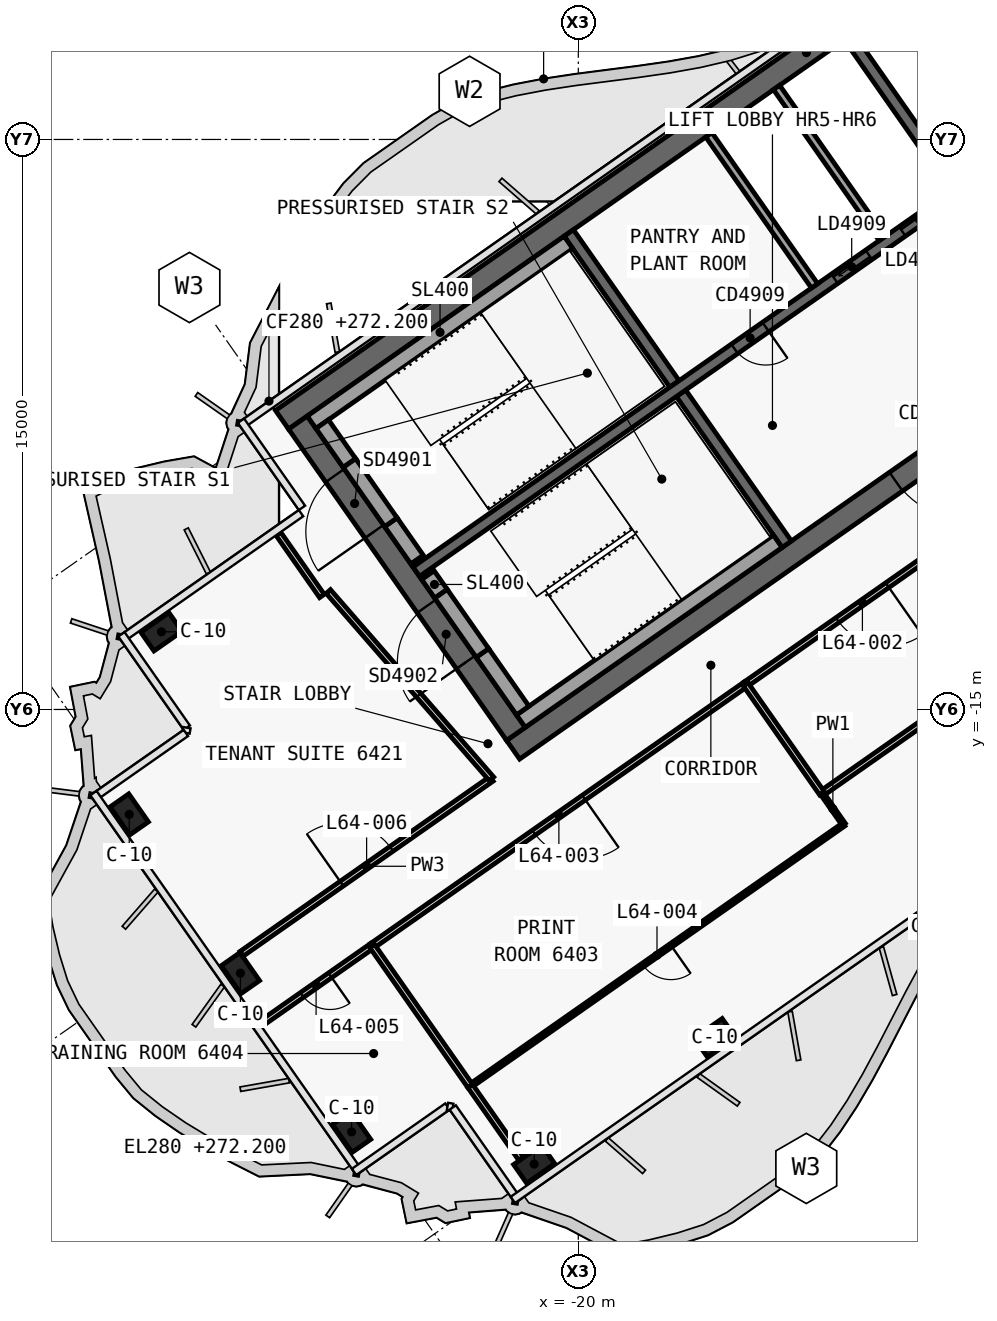
"""IFC4 building model, lengths in metres.
Left out: names, types, materials, properties, quantities, classifications, styles, units other than length and angle.
Written with IfcOpenShell. Run it as: python <this file> out.ifc"""

import sys

from ifc_helpers import new_model, si_unit, direction, frame, frame_2d, origin, origin_2d, place, context, subcontext, project, spatial, polyline, rectangle, outline, extrude, element, fill, save


model = new_model("IFC4")
c1 = context("Model", 3, precision=1e-05, world=origin(), true_north=direction((0.0, 1.0)))
c2 = subcontext(c1, "Body", "Model", "MODEL_VIEW")
j1 = project(units=[si_unit("LENGTHUNIT", "METRE"), si_unit("PLANEANGLEUNIT", "RADIAN")], contexts=[c1])
p1 = place(None, origin())
s1 = spatial("IfcSite", under=j1, at=p1, CompositionType="ELEMENT")
p2 = place(p1, origin())
s2 = spatial("IfcBuilding", under=s1, at=p2, CompositionType="ELEMENT")
p3 = place(p2, frame((0.0, 0.0, 272.2)))
s3 = spatial("IfcBuildingStorey", under=s2, at=p3, CompositionType="ELEMENT", Elevation=272.2)
p4 = place(p3, frame((-0.028, 12.066, 0.0), z_axis=(0.0, 0.0, 1.0), x_axis=(-0.819151382952, -0.573577380837, 0.0)))
e1 = element("IfcWall", 1, at=p4, inside=s3, PredefinedType="SHEAR", context=c2, shape_type="SweptSolid", body=[
    extrude(outline(polyline([(33.898, 0.3), (0.42, 0.3), (0.0, -0.3), (33.898, -0.3), (33.898, 0.3)])), origin(), (0.0, 0.0, 1.0), 3.9),
])
p5 = place(p3, frame((-0.028, -0.874, 0.0), z_axis=(0.0, 0.0, 1.0), x_axis=(-0.819150035022, -0.573579305871, 0.0)))
e2 = element("IfcWall", 2, at=p5, inside=s3, PredefinedType="SHEAR", context=c2, shape_type="SweptSolid", body=[
    extrude(outline(polyline([(26.476, 0.3), (0.42, 0.3), (0.0, -0.3), (26.476, -0.3), (26.476, 0.3)])), origin(), (0.0, 0.0, 1.0), 3.9),
])
p6 = place(p5, frame((2.976, 0.0, 0.0)))
e3 = element("IfcOpeningElement", 3, at=p6, cuts=e2, PredefinedType="OPENING", context=c2, shape_type="SweptSolid", body=[
    extrude(rectangle(XDim=2.4, YDim=2.1, at=frame_2d((1.2, 1.05))), frame((0.0, 0.31, 0.0), z_axis=(0.0, -1.0, 0.0), x_axis=(1.0, 0.0, 0.0)), (0.0, 0.0, 1.0), 0.62),
])
p7 = place(p5, frame((11.776, 0.0, 0.0)))
e4 = element("IfcOpeningElement", 4, at=p7, cuts=e2, PredefinedType="OPENING", context=c2, shape_type="SweptSolid", body=[
    extrude(rectangle(XDim=2.4, YDim=2.1, at=frame_2d((1.2, 1.05))), frame((0.0, 0.31, 0.0), z_axis=(0.0, -1.0, 0.0), x_axis=(1.0, 0.0, 0.0)), (0.0, 0.0, 1.0), 0.62),
])
p8 = place(p3, frame((-21.642, -15.642, 0.0), z_axis=(0.0, 0.0, 1.0), x_axis=(-0.573586866468, 0.819144740944, 0.0)))
e5 = element("IfcWall", 5, at=p8, inside=s3, PredefinedType="SHEAR", context=c2, shape_type="SweptSolid", body=[
    extrude(outline(polyline([(0.0, 0.3), (0.0, -0.3), (10.0, -0.3), (10.0, 0.3), (0.0, 0.3)])), origin(), (0.0, 0.0, 1.0), 3.9),
])
p9 = place(p8, frame((6.5, 0.0, 0.0)))
e6 = element("IfcOpeningElement", 6, at=p9, cuts=e5, PredefinedType="OPENING", context=c2, shape_type="SweptSolid", body=[
    extrude(rectangle(XDim=1.8, YDim=2.1, at=frame_2d((0.9, 1.05))), frame((0.0, 0.31, 0.0), z_axis=(0.0, -1.0, 0.0), x_axis=(1.0, 0.0, 0.0)), (0.0, 0.0, 1.0), 0.62),
])
p10 = place(p8, frame((2.3, 0.0, 0.0)))
e7 = element("IfcOpeningElement", 7, at=p10, cuts=e5, PredefinedType="OPENING", context=c2, shape_type="SweptSolid", body=[
    extrude(rectangle(XDim=1.8, YDim=2.1, at=frame_2d((0.9, 1.05))), frame((0.0, 0.31, 0.0), z_axis=(0.0, -1.0, 0.0), x_axis=(1.0, 0.0, 0.0)), (0.0, 0.0, 1.0), 0.62),
])
p11 = place(p3, frame((-10.097, -1.271, 0.0), z_axis=(0.0, 0.0, 1.0), x_axis=(-0.573560315113, 0.819163332265, 0.0)))
e8 = element("IfcWall", 8, at=p11, inside=s3, PredefinedType="SHEAR", context=c2, shape_type="SweptSolid", body=[
    extrude(outline(polyline([(4.85, -0.15), (4.85, 0.15), (0.0, 0.15), (0.0, -0.15), (4.85, -0.15)])), origin(), (0.0, 0.0, 1.0), 3.9),
])
p12 = place(p3, frame((-14.515, -10.652, 0.0), z_axis=(0.0, 0.0, 1.0), x_axis=(-0.573560315113, 0.819163332265, 0.0)))
e9 = element("IfcWall", 9, at=p12, inside=s3, PredefinedType="SHEAR", context=c2, shape_type="SweptSolid", body=[
    extrude(outline(polyline([(4.85, 0.15), (0.0, 0.15), (0.0, -0.15), (4.85, -0.15), (4.85, 0.15)])), origin(), (0.0, 0.0, 1.0), 3.9),
])
p13 = place(p3, frame((-17.469, -6.433, 0.0), z_axis=(0.0, 0.0, 1.0), x_axis=(-0.573594092424, 0.81913968109, 0.0)))
e10 = element("IfcWall", 10, at=p13, inside=s3, PredefinedType="SHEAR", context=c2, shape_type="SweptSolid", body=[
    extrude(outline(polyline([(4.85, -0.15), (4.85, 0.15), (0.0, 0.15), (0.0, -0.15), (4.85, -0.15)])), origin(), (0.0, 0.0, 1.0), 3.9),
])
p14 = place(p3, frame((-2.638, 3.768, 0.0), z_axis=(0.0, 0.0, 1.0), x_axis=(-0.819155014212, -0.573572194837, 0.0)))
e11 = element("IfcWall", 11, at=p14, inside=s3, PredefinedType="SHEAR", context=c2, shape_type="SweptSolid", body=[
    extrude(outline(polyline([(26.4, 0.15), (0.0, 0.15), (0.0, -0.15), (26.4, -0.15), (26.4, 0.15)])), origin(), (0.0, 0.0, 1.0), 3.9),
])
p15 = place(p14, frame((1.169, 0.0, 0.0)))
e12 = element("IfcOpeningElement", 12, at=p15, cuts=e11, PredefinedType="OPENING", context=c2, shape_type="SweptSolid", body=[
    extrude(rectangle(XDim=1.1, YDim=2.1, at=frame_2d((0.55, 1.05))), frame((0.0, 0.16, 0.0), z_axis=(0.0, -1.0, 0.0), x_axis=(1.0, 0.0, 0.0)), (0.0, 0.0, 1.0), 0.32),
])
p16 = place(p14, frame((3.206, 0.0, 0.0)))
e13 = element("IfcOpeningElement", 13, at=p16, cuts=e11, PredefinedType="OPENING", context=c2, shape_type="SweptSolid", body=[
    extrude(rectangle(XDim=1.1, YDim=2.1, at=frame_2d((0.55, 1.05))), frame((0.0, 0.16, 0.0), z_axis=(0.0, -1.0, 0.0), x_axis=(1.0, 0.0, 0.0)), (0.0, 0.0, 1.0), 0.32),
])
p17 = place(p14, frame((5.244, 0.0, 0.0)))
e14 = element("IfcOpeningElement", 14, at=p17, cuts=e11, PredefinedType="OPENING", context=c2, shape_type="SweptSolid", body=[
    extrude(rectangle(XDim=1.1, YDim=2.1, at=frame_2d((0.55, 1.05))), frame((0.0, 0.16, 0.0), z_axis=(0.0, -1.0, 0.0), x_axis=(1.0, 0.0, 0.0)), (0.0, 0.0, 1.0), 0.32),
])
p18 = place(p14, frame((7.281, 0.0, 0.0)))
e15 = element("IfcOpeningElement", 15, at=p18, cuts=e11, PredefinedType="OPENING", context=c2, shape_type="SweptSolid", body=[
    extrude(rectangle(XDim=1.1, YDim=2.1, at=frame_2d((0.55, 1.05))), frame((0.0, 0.16, 0.0), z_axis=(0.0, -1.0, 0.0), x_axis=(1.0, 0.0, 0.0)), (0.0, 0.0, 1.0), 0.32),
])
p19 = place(p14, frame((9.688, 0.0, 0.0)))
e16 = element("IfcOpeningElement", 16, at=p19, cuts=e11, PredefinedType="OPENING", context=c2, shape_type="SweptSolid", body=[
    extrude(rectangle(XDim=1.1, YDim=2.1, at=frame_2d((0.55, 1.05))), frame((0.0, 0.16, 0.0), z_axis=(0.0, -1.0, 0.0), x_axis=(1.0, 0.0, 0.0)), (0.0, 0.0, 1.0), 0.32),
])
p20 = place(p14, frame((11.863, 0.0, 0.0)))
e17 = element("IfcOpeningElement", 17, at=p20, cuts=e11, PredefinedType="OPENING", context=c2, shape_type="SweptSolid", body=[
    extrude(rectangle(XDim=1.1, YDim=2.1, at=frame_2d((0.55, 1.05))), frame((0.0, 0.16, 0.0), z_axis=(0.0, -1.0, 0.0), x_axis=(1.0, 0.0, 0.0)), (0.0, 0.0, 1.0), 0.32),
])
p21 = place(p14, frame((15.175, 0.0, 0.0)))
e18 = element("IfcOpeningElement", 18, at=p21, cuts=e11, PredefinedType="OPENING", context=c2, shape_type="SweptSolid", body=[
    extrude(rectangle(XDim=1.0, YDim=2.1, at=frame_2d((0.5, 1.05))), frame((0.0, 0.16, 0.0), z_axis=(0.0, -1.0, 0.0), x_axis=(1.0, 0.0, 0.0)), (0.0, 0.0, 1.0), 0.32),
])
for number, where, z_axis, x_axis in (
    (19, (-16.41, -23.637, 0.0), (0.0, 0.0, 1.0), (-0.819, -0.574, 0.0)),
    (20, (-21.161, -26.964, 0.0), (0.0, 0.0, 1.0), (-0.819, -0.574, 0.0)),
    (21, (-30.969, -12.956, 0.0), (0.0, 0.0, 1.0), (-0.819, -0.574, 0.0)),
    (22, (-25.966, -26.117, 0.0), (0.0, 0.0, 1.0), (-0.574, 0.819, 0.0)),
    (23, (-28.891, -21.939, 0.0), (0.0, 0.0, 1.0), (-0.574, 0.819, 0.0)),
    (24, (-31.816, -17.761, 0.0), (0.0, 0.0, 1.0), (-0.574, 0.819, 0.0)),
):
    element("IfcColumn", number, at=place(p3, frame(where, z_axis=z_axis, x_axis=x_axis)), inside=s3, PredefinedType="COLUMN", context=c2, shape_type="SweptSolid", body=[
        extrude(rectangle(XDim=0.9, YDim=0.6, at=origin_2d()), origin(), (0.0, 0.0, 1.0), 3.9),
    ])
p22 = place(p3, frame((-8.305, -0.017, 0.0), z_axis=(0.0, 0.0, 1.0), x_axis=(-0.573594092424, 0.81913968109, 0.0)))
e25 = element("IfcWall", 25, at=p22, inside=s3, PredefinedType="SOLIDWALL", context=c2, shape_type="SweptSolid", body=[
    extrude(rectangle(XDim=4.85, YDim=0.2, at=frame_2d((2.425, 0.0))), origin(), (0.0, 0.0, 1.0), 3.9),
])
p23 = place(p3, frame((-12.001, -2.605, 0.0), z_axis=(0.0, 0.0, 1.0), x_axis=(-0.573560315113, 0.819163332265, 0.0)))
e26 = element("IfcWall", 26, at=p23, inside=s3, PredefinedType="SOLIDWALL", context=c2, shape_type="SweptSolid", body=[
    extrude(rectangle(XDim=4.85, YDim=0.2, at=frame_2d((2.425, 0.0))), origin(), (0.0, 0.0, 1.0), 3.9),
])
p24 = place(p3, frame((-13.783, -3.852, 0.0), z_axis=(0.0, 0.0, 1.0), x_axis=(-0.573594092424, 0.81913968109, 0.0)))
e27 = element("IfcWall", 27, at=p24, inside=s3, PredefinedType="SOLIDWALL", context=c2, shape_type="SweptSolid", body=[
    extrude(rectangle(XDim=4.85, YDim=0.2, at=frame_2d((2.425, 0.0))), origin(), (0.0, 0.0, 1.0), 3.9),
])
p25 = place(p3, frame((-20.259, -2.71, 0.0), z_axis=(0.0, 0.0, 1.0), x_axis=(-0.81914849389, -0.573581506813, 0.0)))
e28 = element("IfcWall", 28, at=p25, inside=s3, PredefinedType="SOLIDWALL", context=c2, shape_type="SweptSolid", body=[
    extrude(rectangle(XDim=8.25, YDim=0.4, at=frame_2d((4.125, 0.0))), origin(), (0.0, 0.0, 1.0), 3.62),
])
p26 = place(p3, frame((-24.244, -11.055, 0.0), z_axis=(0.0, 0.0, 1.0), x_axis=(-0.573571582932, 0.819155442668, 0.0)))
e29 = element("IfcWall", 29, at=p26, inside=s3, PredefinedType="SOLIDWALL", context=c2, shape_type="SweptSolid", body=[
    extrude(rectangle(XDim=1.2, YDim=0.4, at=frame_2d((0.6, 0.0))), origin(), (0.0, 0.0, 1.0), 3.62),
])
p27 = place(p3, frame((-26.022, -8.515, 0.0), z_axis=(0.0, 0.0, 1.0), x_axis=(-0.573619628835, 0.819121798889, 0.0)))
e30 = element("IfcWall", 30, at=p27, inside=s3, PredefinedType="SOLIDWALL", context=c2, shape_type="SweptSolid", body=[
    extrude(rectangle(XDim=1.25, YDim=0.4, at=frame_2d((0.625, 0.0))), origin(), (0.0, 0.0, 1.0), 3.62),
])
p28 = place(p3, frame((-24.932, -10.072, 2.15), z_axis=(0.0, 0.0, 1.0), x_axis=(-0.573591692345, 0.819141361715, 0.0)))
e31 = element("IfcWall", 31, at=p28, inside=s3, PredefinedType="SOLIDWALL", context=c2, shape_type="SweptSolid", body=[
    extrude(rectangle(XDim=1.9, YDim=0.4, at=frame_2d((0.95, 0.0))), origin(), (0.0, 0.0, 1.0), 1.47),
])
p29 = place(p3, frame((-14.753, -10.574, 0.0), z_axis=(0.0, 0.0, 1.0), x_axis=(-0.819158229677, -0.573567602601, 0.0)))
e32 = element("IfcWall", 32, at=p29, inside=s3, PredefinedType="SOLIDWALL", context=c2, shape_type="SweptSolid", body=[
    extrude(rectangle(XDim=8.25, YDim=0.4, at=frame_2d((4.125, 0.0))), origin(), (0.0, 0.0, 1.0), 3.62),
])
p30 = place(p3, frame((-21.462, -15.028, 0.0), z_axis=(0.0, 0.0, 1.0), x_axis=(-0.573559770908, 0.819163713305, 0.0)))
e33 = element("IfcWall", 33, at=p30, inside=s3, PredefinedType="SOLIDWALL", context=c2, shape_type="SweptSolid", body=[
    extrude(rectangle(XDim=1.85, YDim=0.4, at=frame_2d((0.925, 0.0))), origin(), (0.0, 0.0, 1.0), 3.62),
])
p31 = place(p3, frame((-23.613, -11.956, 0.0), z_axis=(0.0, 0.0, 1.0), x_axis=(-0.573435029941, 0.819251039936, 0.0)))
e34 = element("IfcWall", 34, at=p31, inside=s3, PredefinedType="SOLIDWALL", context=c2, shape_type="SweptSolid", body=[
    extrude(rectangle(XDim=0.6, YDim=0.4, at=frame_2d((0.3, 0.0))), origin(), (0.0, 0.0, 1.0), 3.62),
])
p32 = place(p3, frame((-22.523, -13.512, 2.15), z_axis=(0.0, 0.0, 1.0), x_axis=(-0.573591692345, 0.819141361715, 0.0)))
e35 = element("IfcWall", 35, at=p32, inside=s3, PredefinedType="SOLIDWALL", context=c2, shape_type="SweptSolid", body=[
    extrude(rectangle(XDim=1.9, YDim=0.4, at=frame_2d((0.95, 0.0))), origin(), (0.0, 0.0, 1.0), 1.47),
])
p33 = place(p3, frame((-28.858, -21.428, 0.0), z_axis=(0.0, 0.0, 1.0), x_axis=(0.819137602434, 0.573597060905, 0.0)))
e36 = element("IfcWall", 36, at=p33, inside=s3, PredefinedType="PARTITIONING", context=c2, shape_type="SweptSolid", body=[
    extrude(rectangle(XDim=8.027, YDim=0.15, at=frame_2d((4.013, 0.0))), origin(), (0.0, 0.0, 1.0), 3.05),
])
p34 = place(p33, frame((3.213, 0.0, 0.0)))
e37 = element("IfcOpeningElement", 37, at=p34, cuts=e36, PredefinedType="OPENING", context=c2, shape_type="SweptSolid", body=[
    extrude(rectangle(XDim=1.6, YDim=2.1, at=frame_2d((0.8, 1.05))), frame((0.0, 0.085, 0.0), z_axis=(0.0, -1.0, 0.0), x_axis=(1.0, 0.0, 0.0)), (0.0, 0.0, 1.0), 0.17),
])
p35 = place(p3, frame((-9.451, -10.036, 0.0), z_axis=(0.0, 0.0, 1.0), x_axis=(-0.819164661457, -0.573558416746, 0.0)))
e38 = element("IfcWall", 38, at=p35, inside=s3, PredefinedType="PARTITIONING", context=c2, shape_type="SweptSolid", body=[
    extrude(rectangle(XDim=7.504, YDim=0.15, at=frame_2d((3.752, 0.0))), origin(), (0.0, 0.0, 1.0), 3.05),
])
p36 = place(p35, frame((2.952, 0.0, 0.0)))
e39 = element("IfcOpeningElement", 39, at=p36, cuts=e38, PredefinedType="OPENING", context=c2, shape_type="SweptSolid", body=[
    extrude(rectangle(XDim=1.6, YDim=2.1, at=frame_2d((0.8, 1.05))), frame((0.0, 0.085, 0.0), z_axis=(0.0, -1.0, 0.0), x_axis=(1.0, 0.0, 0.0)), (0.0, 0.0, 1.0), 0.17),
])
p37 = place(p3, frame((-15.594, -14.338, 0.0), z_axis=(0.0, 0.0, 1.0), x_axis=(-0.819154519377, -0.573572901543, 0.0)))
e40 = element("IfcWall", 40, at=p37, inside=s3, PredefinedType="PARTITIONING", context=c2, shape_type="SweptSolid", body=[
    extrude(rectangle(XDim=12.004, YDim=0.15, at=frame_2d((6.002, 0.0))), origin(), (0.0, 0.0, 1.0), 3.05),
])
p38 = place(p37, frame((5.202, 0.0, 0.0)))
e41 = element("IfcOpeningElement", 41, at=p38, cuts=e40, PredefinedType="OPENING", context=c2, shape_type="SweptSolid", body=[
    extrude(rectangle(XDim=1.6, YDim=2.1, at=frame_2d((0.8, 1.05))), frame((0.0, 0.085, 0.0), z_axis=(0.0, -1.0, 0.0), x_axis=(1.0, 0.0, 0.0)), (0.0, 0.0, 1.0), 0.17),
])
p39 = place(p3, frame((-25.424, -21.22, 0.0), z_axis=(0.0, 0.0, 1.0), x_axis=(-0.819142755392, -0.573589702042, 0.0)))
e42 = element("IfcWall", 42, at=p39, inside=s3, PredefinedType="PARTITIONING", context=c2, shape_type="SweptSolid", body=[
    extrude(rectangle(XDim=3.602, YDim=0.15, at=frame_2d((1.801, 0.0))), origin(), (0.0, 0.0, 1.0), 3.0),
])
p40 = place(p39, frame((1.351, 0.0, 0.0)))
e43 = element("IfcOpeningElement", 43, at=p40, cuts=e42, PredefinedType="OPENING", context=c2, shape_type="SweptSolid", body=[
    extrude(rectangle(XDim=0.9, YDim=2.1, at=frame_2d((0.45, 1.05))), frame((0.0, 0.085, 0.0), z_axis=(0.0, -1.0, 0.0), x_axis=(1.0, 0.0, 0.0)), (0.0, 0.0, 1.0), 0.17),
])
p41 = place(p3, frame((-26.746, -12.014, 0.0), z_axis=(0.0, 0.0, 1.0), x_axis=(-0.573568836472, 0.819157365729, 0.0)))
e44 = element("IfcWall", 44, at=p41, inside=s3, PredefinedType="PARTITIONING", context=c2, shape_type="SweptSolid", body=[
    extrude(rectangle(XDim=2.0, YDim=0.15, at=frame_2d((1.0, 0.0))), origin(), (0.0, 0.0, 1.0), 3.05),
])
p42 = place(p3, frame((-22.284, -16.826, 0.0), z_axis=(0.0, 0.0, 1.0), x_axis=(-0.656758142177, 0.754101281449, 0.0)))
e45 = element("IfcWall", 45, at=p42, inside=s3, PredefinedType="PARTITIONING", context=c2, shape_type="SweptSolid", body=[
    extrude(rectangle(XDim=6.539, YDim=0.15, at=frame_2d((3.269, 0.0))), origin(), (0.0, 0.0, 1.0), 3.62),
])
p43 = place(p3, frame((-7.445, -12.904, 0.0), z_axis=(0.0, 0.0, 1.0), x_axis=(-0.819137093595, -0.573597787563, 0.0)))
e46 = element("IfcWall", 46, at=p43, inside=s3, PredefinedType="PARTITIONING", context=c2, shape_type="SweptSolid", body=[
    extrude(rectangle(XDim=7.5, YDim=0.15, at=frame_2d((3.75, 0.0))), origin(), (0.0, 0.0, 1.0), 3.05),
])
p44 = place(p3, frame((-13.589, -17.206, 0.0), z_axis=(0.0, 0.0, 1.0), x_axis=(-0.573565328398, 0.819159822049, 0.0)))
e47 = element("IfcWall", 47, at=p44, inside=s3, PredefinedType="PARTITIONING", context=c2, shape_type="SweptSolid", body=[
    extrude(rectangle(XDim=3.5, YDim=0.15, at=frame_2d((1.75, 0.0))), origin(), (0.0, 0.0, 1.0), 3.62),
])
p45 = place(p3, frame((-13.588, -17.207, 0.0), z_axis=(0.0, 0.0, 1.0), x_axis=(0.573708088123, -0.819059844958, 0.0)))
e48 = element("IfcWall", 48, at=p45, inside=s3, PredefinedType="PARTITIONING", context=c2, shape_type="SweptSolid", body=[
    extrude(rectangle(XDim=1.0, YDim=0.1, at=frame_2d((0.5, 0.0))), origin(), (0.0, 0.0, 1.0), 3.62),
])
p46 = place(p3, frame((-13.014, -18.026, 0.0), z_axis=(0.0, 0.0, 1.0), x_axis=(-0.819146845232, -0.573583861302, 0.0)))
e49 = element("IfcWall", 49, at=p46, inside=s3, PredefinedType="PARTITIONING", context=c2, shape_type="SweptSolid", body=[
    extrude(rectangle(XDim=12.0, YDim=0.1, at=frame_2d((6.0, 0.0))), origin(), (0.0, 0.0, 1.0), 3.05),
])
p47 = place(p46, frame((5.55, 0.0, 0.0)))
e50 = element("IfcOpeningElement", 50, at=p47, cuts=e49, PredefinedType="OPENING", context=c2, shape_type="SweptSolid", body=[
    extrude(rectangle(XDim=0.9, YDim=2.1, at=frame_2d((0.45, 1.05))), frame((0.0, 0.06, 0.0), z_axis=(0.0, -1.0, 0.0), x_axis=(1.0, 0.0, 0.0)), (0.0, 0.0, 1.0), 0.12),
])
p48 = place(p3, frame((-21.509, -26.816, 0.0), z_axis=(0.0, 0.0, 1.0), x_axis=(-0.573546771379, 0.819172815126, 0.0)))
e51 = element("IfcWall", 51, at=p48, inside=s3, PredefinedType="PARTITIONING", context=c2, shape_type="SweptSolid", body=[
    extrude(rectangle(XDim=2.329, YDim=0.15, at=frame_2d((1.165, 0.0))), origin(), (0.0, 0.0, 1.0), 3.0),
])
p49 = place(p3, frame((-22.845, -24.908, 0.0), z_axis=(0.0, 0.0, 1.0), x_axis=(-0.573586141663, 0.819145248471, 0.0)))
e52 = element("IfcWall", 52, at=p49, inside=s3, PredefinedType="PARTITIONING", context=c2, shape_type="SweptSolid", body=[
    extrude(rectangle(XDim=4.5, YDim=0.15, at=frame_2d((2.25, 0.0))), origin(), (0.0, 0.0, 1.0), 3.05),
])
p50 = place(p19, origin())
e53 = element("IfcDoor", 53, at=p50, inside=s3, OperationType="SLIDING_TO_LEFT", PredefinedType="DOOR", context=c2, shape_type="SweptSolid", body=[
    extrude(rectangle(XDim=1.1, YDim=2.1, at=frame_2d((0.55, 1.05))), frame((0.0, 0.025, 0.0), z_axis=(0.0, -1.0, 0.0), x_axis=(1.0, 0.0, 0.0)), (0.0, 0.0, 1.0), 0.05),
])
fill(e16, e53)
p51 = place(p20, origin())
e54 = element("IfcDoor", 54, at=p51, inside=s3, OperationType="SLIDING_TO_RIGHT", PredefinedType="DOOR", context=c2, shape_type="SweptSolid", body=[
    extrude(rectangle(XDim=1.1, YDim=2.1, at=frame_2d((0.55, 1.05))), frame((0.0, 0.025, 0.0), z_axis=(0.0, -1.0, 0.0), x_axis=(1.0, 0.0, 0.0)), (0.0, 0.0, 1.0), 0.05),
])
fill(e17, e54)
p52 = place(p21, origin())
e55 = element("IfcDoor", 55, at=p52, inside=s3, OperationType="SINGLE_SWING_RIGHT", PredefinedType="DOOR", context=c2, shape_type="SweptSolid", body=[
    extrude(rectangle(XDim=1.0, YDim=2.1, at=frame_2d((0.5, 1.05))), frame((0.0, 0.025, 0.0), z_axis=(0.0, -1.0, 0.0), x_axis=(1.0, 0.0, 0.0)), (0.0, 0.0, 1.0), 0.05),
])
fill(e18, e55)
p53 = place(p7, origin())
e56 = element("IfcDoor", 56, at=p53, inside=s3, OperationType="DOUBLE_DOOR_SINGLE_SWING", PredefinedType="DOOR", context=c2, shape_type="SweptSolid", body=[
    extrude(rectangle(XDim=2.4, YDim=2.1, at=frame_2d((1.2, 1.05))), frame((0.0, 0.025, 0.0), z_axis=(0.0, -1.0, 0.0), x_axis=(1.0, 0.0, 0.0)), (0.0, 0.0, 1.0), 0.05),
])
fill(e4, e56)
p54 = place(p9, origin())
e57 = element("IfcDoor", 57, at=p54, inside=s3, OperationType="DOUBLE_DOOR_SINGLE_SWING", PredefinedType="DOOR", context=c2, shape_type="SweptSolid", body=[
    extrude(rectangle(XDim=1.8, YDim=2.1, at=frame_2d((0.9, 1.05))), frame((0.0, 0.025, 0.0), z_axis=(0.0, -1.0, 0.0), x_axis=(1.0, 0.0, 0.0)), (0.0, 0.0, 1.0), 0.05),
])
fill(e6, e57)
p55 = place(p10, origin())
e58 = element("IfcDoor", 58, at=p55, inside=s3, OperationType="DOUBLE_DOOR_SINGLE_SWING", PredefinedType="DOOR", context=c2, shape_type="SweptSolid", body=[
    extrude(rectangle(XDim=1.8, YDim=2.1, at=frame_2d((0.9, 1.05))), frame((0.0, 0.025, 0.0), z_axis=(0.0, -1.0, 0.0), x_axis=(1.0, 0.0, 0.0)), (0.0, 0.0, 1.0), 0.05),
])
fill(e7, e58)
p56 = place(p36, origin())
e59 = element("IfcDoor", 59, at=p56, inside=s3, OperationType="DOUBLE_DOOR_SINGLE_SWING", PredefinedType="DOOR", context=c2, shape_type="SweptSolid", body=[
    extrude(rectangle(XDim=1.6, YDim=2.1, at=frame_2d((0.8, 1.05))), frame((0.0, 0.025, 0.0), z_axis=(0.0, -1.0, 0.0), x_axis=(1.0, 0.0, 0.0)), (0.0, 0.0, 1.0), 0.05),
])
fill(e39, e59)
p57 = place(p38, origin())
e60 = element("IfcDoor", 60, at=p57, inside=s3, OperationType="DOUBLE_DOOR_SINGLE_SWING", PredefinedType="DOOR", context=c2, shape_type="SweptSolid", body=[
    extrude(rectangle(XDim=1.6, YDim=2.1, at=frame_2d((0.8, 1.05))), frame((0.0, 0.025, 0.0), z_axis=(0.0, -1.0, 0.0), x_axis=(1.0, 0.0, 0.0)), (0.0, 0.0, 1.0), 0.05),
])
fill(e41, e60)
p58 = place(p47, origin())
e61 = element("IfcDoor", 61, at=p58, inside=s3, OperationType="SINGLE_SWING_RIGHT", PredefinedType="DOOR", context=c2, shape_type="SweptSolid", body=[
    extrude(rectangle(XDim=0.9, YDim=2.1, at=frame_2d((0.45, 1.05))), frame((0.0, 0.025, 0.0), z_axis=(0.0, -1.0, 0.0), x_axis=(1.0, 0.0, 0.0)), (0.0, 0.0, 1.0), 0.05),
])
fill(e50, e61)
p59 = place(p40, origin())
e62 = element("IfcDoor", 62, at=p59, inside=s3, OperationType="SINGLE_SWING_LEFT", PredefinedType="DOOR", context=c2, shape_type="SweptSolid", body=[
    extrude(rectangle(XDim=0.9, YDim=2.1, at=frame_2d((0.45, 1.05))), frame((0.0, 0.025, 0.0), z_axis=(0.0, -1.0, 0.0), x_axis=(1.0, 0.0, 0.0)), (0.0, 0.0, 1.0), 0.05),
])
fill(e43, e62)
p60 = place(p34, origin())
e63 = element("IfcDoor", 63, at=p60, inside=s3, OperationType="DOUBLE_DOOR_SINGLE_SWING", PredefinedType="DOOR", context=c2, shape_type="SweptSolid", body=[
    extrude(rectangle(XDim=1.6, YDim=2.1, at=frame_2d((0.8, 1.05))), frame((0.0, 0.025, 0.0), z_axis=(0.0, -1.0, 0.0), x_axis=(1.0, 0.0, 0.0)), (0.0, 0.0, 1.0), 0.05),
])
fill(e37, e63)
save(model, sys.argv[1])
